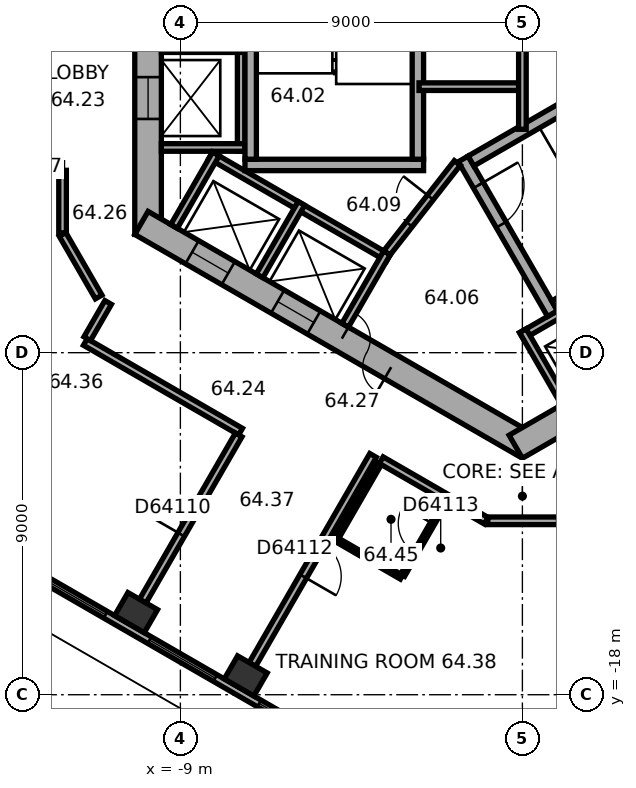
"""IFC4 building model, lengths in metres.
Left out: names, types, materials, properties, quantities, classifications, styles, units other than length and angle.
Written with IfcOpenShell. Run it as: python <this file> out.ifc"""

import sys

from ifc_helpers import new_model, si_unit, direction, frame, frame_2d, origin, origin_2d, place, context, subcontext, project, spatial, rectangle, extrude, element, fill, save


model = new_model("IFC4")
c1 = context("Model", 3, precision=1e-05, world=origin(), true_north=direction((0.0, 1.0)))
c2 = subcontext(c1, "Body", "Model", "MODEL_VIEW")
j1 = project(units=[si_unit("LENGTHUNIT", "METRE"), si_unit("PLANEANGLEUNIT", "RADIAN")], contexts=[c1])
p1 = place(None, origin())
s1 = spatial("IfcSite", under=j1, at=p1, CompositionType="ELEMENT")
p2 = place(p1, origin())
s2 = spatial("IfcBuilding", under=s1, at=p2, CompositionType="ELEMENT")
p3 = place(p2, frame((0.0, 0.0, 259.8)))
s3 = spatial("IfcBuildingStorey", under=s2, at=p3, CompositionType="ELEMENT", Elevation=259.8)
for number, where, z_axis, x_axis in (
    (1, (-10.165, -15.84, 0.0), (0.0, 0.0, 1.0), (0.866, -0.5, 0.0)),
    (2, (-7.28, -17.505, 0.0), (0.0, 0.0, 1.0), (0.866, -0.5, 0.0)),
):
    element("IfcColumn", number, at=place(p3, frame(where, z_axis=z_axis, x_axis=x_axis)), inside=s3, PredefinedType="COLUMN", context=c2, shape_type="SweptSolid", body=[
        extrude(rectangle(XDim=0.9, YDim=0.7, at=origin_2d()), origin(), (0.0, 0.0, 1.0), 3.7),
    ])
p4 = place(p3, frame((-9.85, 5.889, 0.0), z_axis=(0.0, 0.0, 1.0), x_axis=(0.0, -1.0, 0.0)))
e3 = element("IfcWall", 3, at=p4, inside=s3, PredefinedType="SHEAR", context=c2, shape_type="SweptSolid", body=[
    extrude(rectangle(XDim=11.778, YDim=0.7, at=frame_2d((5.889, 0.0))), origin(), (0.0, 0.0, 1.0), 3.7),
])
p5 = place(p4, frame((5.039, 0.0, 0.0)))
e4 = element("IfcOpeningElement", 4, at=p5, cuts=e3, PredefinedType="OPENING", context=c2, shape_type="SweptSolid", body=[
    extrude(rectangle(XDim=1.1, YDim=2.1, at=frame_2d((0.55, 1.05))), frame((0.0, 0.36, 0.0), z_axis=(0.0, -1.0, 0.0), x_axis=(1.0, 0.0, 0.0)), (0.0, 0.0, 1.0), 0.72),
])
p6 = place(p4, frame((7.639, 0.0, 0.0)))
e5 = element("IfcOpeningElement", 5, at=p6, cuts=e3, PredefinedType="OPENING", context=c2, shape_type="SweptSolid", body=[
    extrude(rectangle(XDim=1.1, YDim=2.1, at=frame_2d((0.55, 1.05))), frame((0.0, 0.36, 0.0), z_axis=(0.0, -1.0, 0.0), x_axis=(1.0, 0.0, 0.0)), (0.0, 0.0, 1.0), 0.72),
])
p7 = place(p3, frame((-10.025, -5.586, 0.0), z_axis=(0.0, 0.0, 1.0), x_axis=(0.866026453023, -0.499998182661, 0.0)))
e6 = element("IfcWall", 6, at=p7, inside=s3, PredefinedType="SHEAR", context=c2, shape_type="SweptSolid", body=[
    extrude(rectangle(XDim=11.778, YDim=0.7, at=frame_2d((5.889, 0.0))), origin(), (0.0, 0.0, 1.0), 3.7),
])
p8 = place(p7, frame((6.089, 0.0, 0.0)))
e7 = element("IfcOpeningElement", 7, at=p8, cuts=e6, PredefinedType="OPENING", context=c2, shape_type="SweptSolid", body=[
    extrude(rectangle(XDim=1.5, YDim=2.1, at=frame_2d((0.75, 1.05))), frame((0.0, 0.36, 0.0), z_axis=(0.0, -1.0, 0.0), x_axis=(1.0, 0.0, 0.0)), (0.0, 0.0, 1.0), 0.72),
])
p9 = place(p7, frame((1.539, 0.0, 0.0)))
e8 = element("IfcOpeningElement", 8, at=p9, cuts=e6, PredefinedType="OPENING", context=c2, shape_type="SweptSolid", body=[
    extrude(rectangle(XDim=1.1, YDim=2.1, at=frame_2d((0.55, 1.05))), frame((0.0, 0.36, 0.0), z_axis=(0.0, -1.0, 0.0), x_axis=(1.0, 0.0, 0.0)), (0.0, 0.0, 1.0), 0.72),
])
p10 = place(p7, frame((4.139, 0.0, 0.0)))
e9 = element("IfcOpeningElement", 9, at=p10, cuts=e6, PredefinedType="OPENING", context=c2, shape_type="SweptSolid", body=[
    extrude(rectangle(XDim=1.1, YDim=2.1, at=frame_2d((0.55, 1.05))), frame((0.0, 0.36, 0.0), z_axis=(0.0, -1.0, 0.0), x_axis=(1.0, 0.0, 0.0)), (0.0, 0.0, 1.0), 0.72),
])
p11 = place(p3, frame((-0.175, -11.475, 0.0), z_axis=(0.0, 0.0, 1.0), x_axis=(0.866026453023, 0.499998182661, 0.0)))
e10 = element("IfcWall", 10, at=p11, inside=s3, PredefinedType="SHEAR", context=c2, shape_type="SweptSolid", body=[
    extrude(rectangle(XDim=11.778, YDim=0.7, at=frame_2d((5.889, 0.0))), origin(), (0.0, 0.0, 1.0), 3.7),
])
p12 = place(p11, frame((2.439, 0.0, 0.0)))
e11 = element("IfcOpeningElement", 11, at=p12, cuts=e10, PredefinedType="OPENING", context=c2, shape_type="SweptSolid", body=[
    extrude(rectangle(XDim=1.1, YDim=2.1, at=frame_2d((0.55, 1.05))), frame((0.0, 0.36, 0.0), z_axis=(0.0, -1.0, 0.0), x_axis=(1.0, 0.0, 0.0)), (0.0, 0.0, 1.0), 0.72),
])
p13 = place(p11, frame((5.039, 0.0, 0.0)))
e12 = element("IfcOpeningElement", 12, at=p13, cuts=e10, PredefinedType="OPENING", context=c2, shape_type="SweptSolid", body=[
    extrude(rectangle(XDim=1.1, YDim=2.1, at=frame_2d((0.55, 1.05))), frame((0.0, 0.36, 0.0), z_axis=(0.0, -1.0, 0.0), x_axis=(1.0, 0.0, 0.0)), (0.0, 0.0, 1.0), 0.72),
])
p14 = place(p11, frame((7.639, 0.0, 0.0)))
e13 = element("IfcOpeningElement", 13, at=p14, cuts=e10, PredefinedType="OPENING", context=c2, shape_type="SweptSolid", body=[
    extrude(rectangle(XDim=1.1, YDim=2.1, at=frame_2d((0.55, 1.05))), frame((0.0, 0.36, 0.0), z_axis=(0.0, -1.0, 0.0), x_axis=(1.0, 0.0, 0.0)), (0.0, 0.0, 1.0), 0.72),
])
p15 = place(p3, frame((-16.626, -12.629, 0.0), z_axis=(0.0, 0.0, 1.0), x_axis=(0.866026460444, -0.499998169808, 0.0)))
e14 = element("IfcWall", 14, at=p15, inside=s3, PredefinedType="STANDARD", context=c2, shape_type="SweptSolid", body=[
    extrude(rectangle(XDim=17.731, YDim=0.2, at=frame_2d((8.866, 0.0))), origin(), (0.0, 0.0, 1.0), 3.7),
])
p16 = place(p15, frame((1.203, 0.0, 0.9)))
e15 = element("IfcOpeningElement", 15, at=p16, cuts=e14, PredefinedType="OPENING", context=c2, shape_type="SweptSolid", body=[
    extrude(rectangle(XDim=2.0, YDim=2.0, at=frame_2d((1.0, 1.0))), frame((0.0, 0.11, 0.0), z_axis=(0.0, -1.0, 0.0), x_axis=(1.0, 0.0, 0.0)), (0.0, 0.0, 1.0), 0.22),
])
p17 = place(p15, frame((4.535, 0.0, 0.9)))
e16 = element("IfcOpeningElement", 16, at=p17, cuts=e14, PredefinedType="OPENING", context=c2, shape_type="SweptSolid", body=[
    extrude(rectangle(XDim=2.0, YDim=2.0, at=frame_2d((1.0, 1.0))), frame((0.0, 0.11, 0.0), z_axis=(0.0, -1.0, 0.0), x_axis=(1.0, 0.0, 0.0)), (0.0, 0.0, 1.0), 0.22),
])
p18 = place(p15, frame((7.867, 0.0, 0.9)))
e17 = element("IfcOpeningElement", 17, at=p18, cuts=e14, PredefinedType="OPENING", context=c2, shape_type="SweptSolid", body=[
    extrude(rectangle(XDim=2.0, YDim=2.0, at=frame_2d((1.0, 1.0))), frame((0.0, 0.11, 0.0), z_axis=(0.0, -1.0, 0.0), x_axis=(1.0, 0.0, 0.0)), (0.0, 0.0, 1.0), 0.22),
])
p19 = place(p15, frame((11.198, 0.0, 0.9)))
e18 = element("IfcOpeningElement", 18, at=p19, cuts=e14, PredefinedType="OPENING", context=c2, shape_type="SweptSolid", body=[
    extrude(rectangle(XDim=2.0, YDim=2.0, at=frame_2d((1.0, 1.0))), frame((0.0, 0.11, 0.0), z_axis=(0.0, -1.0, 0.0), x_axis=(1.0, 0.0, 0.0)), (0.0, 0.0, 1.0), 0.22),
])
p20 = place(p15, frame((14.53, 0.0, 0.9)))
e19 = element("IfcOpeningElement", 19, at=p20, cuts=e14, PredefinedType="OPENING", context=c2, shape_type="SweptSolid", body=[
    extrude(rectangle(XDim=2.0, YDim=2.0, at=frame_2d((1.0, 1.0))), frame((0.0, 0.11, 0.0), z_axis=(0.0, -1.0, 0.0), x_axis=(1.0, 0.0, 0.0)), (0.0, 0.0, 1.0), 0.22),
])
p21 = place(p3, frame((-7.4, 4.3, 0.0), z_axis=(0.0, 0.0, 1.0), x_axis=(0.0, -1.0, 0.0)))
e20 = element("IfcWall", 20, at=p21, inside=s3, PredefinedType="PARTITIONING", context=c2, shape_type="SweptSolid", body=[
    extrude(rectangle(XDim=8.0, YDim=0.2, at=frame_2d((4.0, 0.0))), origin(), (0.0, 0.0, 1.0), 3.42),
])
p22 = place(p3, frame((-7.3, -3.6, 0.0), z_axis=(0.0, 0.0, 1.0), x_axis=(-1.0, 0.0, 0.0)))
e21 = element("IfcWall", 21, at=p22, inside=s3, PredefinedType="PARTITIONING", context=c2, shape_type="SweptSolid", body=[
    extrude(rectangle(XDim=2.2, YDim=0.2, at=frame_2d((1.1, 0.0))), origin(), (0.0, 0.0, 1.0), 3.42),
])
p23 = place(p3, frame((-8.203, -3.809, 0.0), z_axis=(0.0, 0.0, 1.0), x_axis=(0.866028230842, -0.499995103361, 0.0)))
e22 = element("IfcWall", 22, at=p23, inside=s3, PredefinedType="PARTITIONING", context=c2, shape_type="SweptSolid", body=[
    extrude(rectangle(XDim=5.4, YDim=0.2, at=frame_2d((2.7, 0.0))), origin(), (0.0, 0.0, 1.0), 3.42),
])
for number, where, z_axis, x_axis in (
    (23, (-8.067, -3.772, 0.0), (0.0, 0.0, 1.0), (-0.5, -0.866, 0.0)),
    (24, (-5.815, -5.072, 0.0), (0.0, 0.0, 1.0), (-0.5, -0.866, 0.0)),
):
    element("IfcWall", number, at=place(p3, frame(where, z_axis=z_axis, x_axis=x_axis)), inside=s3, PredefinedType="PARTITIONING", context=c2, shape_type="SweptSolid", body=[
        extrude(rectangle(XDim=2.2, YDim=0.2, at=frame_2d((1.1, 0.0))), origin(), (0.0, 0.0, 1.0), 3.42),
    ])
p24 = place(p3, frame((-3.563, -6.372, 0.0), z_axis=(0.0, 0.0, 1.0), x_axis=(-0.499994660107, -0.866028486751, 0.0)))
e25 = element("IfcWall", 25, at=p24, inside=s3, PredefinedType="PARTITIONING", context=c2, shape_type="SweptSolid", body=[
    extrude(rectangle(XDim=2.2, YDim=0.2, at=frame_2d((1.1, 0.0))), origin(), (0.0, 0.0, 1.0), 3.42),
])
p25 = place(p3, frame((-0.024, -8.559, 0.0), z_axis=(0.0, 0.0, 1.0), x_axis=(0.866026010844, 0.49999894854, 0.0)))
e26 = element("IfcWall", 26, at=p25, inside=s3, PredefinedType="PARTITIONING", context=c2, shape_type="SweptSolid", body=[
    extrude(rectangle(XDim=8.0, YDim=0.2, at=frame_2d((4.0, 0.0))), origin(), (0.0, 0.0, 1.0), 3.42),
])
p26 = place(p3, frame((0.013, -8.422, 0.0), z_axis=(0.0, 0.0, 1.0), x_axis=(0.500077893725, -0.86598042715, 0.0)))
e27 = element("IfcWall", 27, at=p26, inside=s3, PredefinedType="PARTITIONING", context=c2, shape_type="SweptSolid", body=[
    extrude(rectangle(XDim=2.2, YDim=0.2, at=frame_2d((1.1, 0.0))), origin(), (0.0, 0.0, 1.0), 3.42),
])
p27 = place(p3, frame((-2.6, -4.06, 0.0), z_axis=(0.0, 0.0, 1.0), x_axis=(-1.0, 0.0, 0.0)))
e28 = element("IfcWall", 28, at=p27, inside=s3, PredefinedType="SHEAR", context=c2, shape_type="SweptSolid", body=[
    extrude(rectangle(XDim=4.7, YDim=0.3, at=frame_2d((2.35, 0.0))), origin(), (0.0, 0.0, 1.0), 3.42),
])
for number, where, z_axis, x_axis in (
    (29, (-2.75, 3.15, 0.0), (0.0, 0.0, 1.0), (0.0, -1.0, 0.0)),
    (30, (-7.15, 3.15, 0.0), (0.0, 0.0, 1.0), (0.0, -1.0, 0.0)),
):
    element("IfcWall", number, at=place(p3, frame(where, z_axis=z_axis, x_axis=x_axis)), inside=s3, PredefinedType="SHEAR", context=c2, shape_type="SweptSolid", body=[
        extrude(rectangle(XDim=7.06, YDim=0.3, at=frame_2d((3.53, 0.0))), origin(), (0.0, 0.0, 1.0), 3.42),
    ])
p28 = place(p3, frame((-1.558, -3.902, 0.0), z_axis=(0.0, 0.0, 1.0), x_axis=(0.499977259774, -0.866038532462, 0.0)))
e31 = element("IfcWall", 31, at=p28, inside=s3, PredefinedType="SHEAR", context=c2, shape_type="SweptSolid", body=[
    extrude(rectangle(XDim=4.7, YDim=0.3, at=frame_2d((2.35, 0.0))), origin(), (0.0, 0.0, 1.0), 3.42),
])
p29 = place(p28, frame((0.8, 0.0, 0.0)))
e32 = element("IfcOpeningElement", 32, at=p29, cuts=e31, PredefinedType="OPENING", context=c2, shape_type="SweptSolid", body=[
    extrude(rectangle(XDim=1.2, YDim=2.1, at=frame_2d((0.6, 1.05))), frame((0.0, 0.16, 0.0), z_axis=(0.0, -1.0, 0.0), x_axis=(1.0, 0.0, 0.0)), (0.0, 0.0, 1.0), 0.32),
])
for number, where, z_axis, x_axis in (
    (33, (-1.353, -3.957, 0.0), (0.0, 0.0, 1.0), (0.866, 0.5, 0.0)),
    (34, (0.847, -7.767, 0.0), (0.0, 0.0, 1.0), (0.866, 0.5, 0.0)),
):
    element("IfcWall", number, at=place(p3, frame(where, z_axis=z_axis, x_axis=x_axis)), inside=s3, PredefinedType="SHEAR", context=c2, shape_type="SweptSolid", body=[
        extrude(rectangle(XDim=7.06, YDim=0.3, at=frame_2d((3.53, 0.0))), origin(), (0.0, 0.0, 1.0), 3.42),
    ])
p30 = place(p3, frame((-1.712, -4.008, 0.0), z_axis=(0.0, 0.0, 1.0), x_axis=(-0.616549420702, -0.787316208287, 0.0)))
e35 = element("IfcWall", 35, at=p30, inside=s3, PredefinedType="PARTITIONING", context=c2, shape_type="SweptSolid", body=[
    extrude(rectangle(XDim=3.002, YDim=0.2, at=frame_2d((1.501, 0.0))), origin(), (0.0, 0.0, 1.0), 3.42),
])
p31 = place(p30, frame((1.15, 0.0, 0.0)))
e36 = element("IfcOpeningElement", 36, at=p31, cuts=e35, PredefinedType="OPENING", context=c2, shape_type="SweptSolid", body=[
    extrude(rectangle(XDim=0.9, YDim=2.1, at=frame_2d((0.45, 1.05))), frame((0.0, 0.11, 0.0), z_axis=(0.0, -1.0, 0.0), x_axis=(1.0, 0.0, 0.0)), (0.0, 0.0, 1.0), 0.22),
])
p32 = place(p3, frame((-2.72, -2.0, 0.0), z_axis=(0.0, 0.0, 1.0), x_axis=(1.0, 0.0, 0.0)))
e37 = element("IfcWall", 37, at=p32, inside=s3, PredefinedType="PARTITIONING", context=c2, shape_type="SweptSolid", body=[
    extrude(rectangle(XDim=2.62, YDim=0.2, at=frame_2d((1.31, 0.0))), origin(), (0.0, 0.0, 1.0), 3.42),
])
p33 = place(p3, frame((0.0, -3.122, 0.0), z_axis=(0.0, 0.0, 1.0), x_axis=(0.0, 1.0, 0.0)))
e38 = element("IfcWall", 38, at=p33, inside=s3, PredefinedType="PARTITIONING", context=c2, shape_type="SweptSolid", body=[
    extrude(rectangle(XDim=6.245, YDim=0.2, at=frame_2d((3.122, 0.0))), origin(), (0.0, 0.0, 1.0), 3.42),
])
p34 = place(p3, frame((-13.301, -4.101, 0.0), z_axis=(0.0, 0.0, 1.0), x_axis=(1.0, 0.0, 0.0)))
e39 = element("IfcWall", 39, at=p34, inside=s3, PredefinedType="PARTITIONING", context=c2, shape_type="SweptSolid", body=[
    extrude(rectangle(XDim=1.201, YDim=0.2, at=frame_2d((0.601, 0.0))), origin(), (0.0, 0.0, 1.0), 3.42),
])
p35 = place(p3, frame((-12.1, -5.889, 0.0), z_axis=(0.0, 0.0, 1.0), x_axis=(0.500063520245, -0.865988727248, 0.0)))
e40 = element("IfcWall", 40, at=p35, inside=s3, PredefinedType="PARTITIONING", context=c2, shape_type="SweptSolid", body=[
    extrude(rectangle(XDim=1.9, YDim=0.2, at=frame_2d((0.95, 0.0))), origin(), (0.0, 0.0, 1.0), 3.42),
])
p36 = place(p3, frame((-12.1, -4.201, 0.0), z_axis=(0.0, 0.0, 1.0), x_axis=(0.0, -1.0, 0.0)))
e41 = element("IfcWall", 41, at=p36, inside=s3, PredefinedType="PARTITIONING", context=c2, shape_type="SweptSolid", body=[
    extrude(rectangle(XDim=1.648, YDim=0.2, at=frame_2d((0.824, 0.0))), origin(), (0.0, 0.0, 1.0), 3.42),
])
p37 = place(p3, frame((-11.501, -8.719, 0.0), z_axis=(0.0, 0.0, 1.0), x_axis=(0.866024434742, -0.500001678427, 0.0)))
e42 = element("IfcWall", 42, at=p37, inside=s3, PredefinedType="PARTITIONING", context=c2, shape_type="SweptSolid", body=[
    extrude(rectangle(XDim=4.718, YDim=0.2, at=frame_2d((2.359, 0.0))), origin(), (0.0, 0.0, 1.0), 3.42),
])
p38 = place(p3, frame((-10.901, -7.678, 0.0), z_axis=(0.0, 0.0, 1.0), x_axis=(-0.500074377092, -0.865982457891, 0.0)))
e43 = element("IfcWall", 43, at=p38, inside=s3, PredefinedType="PARTITIONING", context=c2, shape_type="SweptSolid", body=[
    extrude(rectangle(XDim=1.101, YDim=0.2, at=frame_2d((0.55, 0.0))), origin(), (0.0, 0.0, 1.0), 3.42),
])
p39 = place(p3, frame((-9.99, -15.537, 0.0), z_axis=(0.0, 0.0, 1.0), x_axis=(0.499966611936, 0.866044679534, 0.0)))
e44 = element("IfcWall", 44, at=p39, inside=s3, PredefinedType="PARTITIONING", context=c2, shape_type="SweptSolid", body=[
    extrude(rectangle(XDim=5.049, YDim=0.2, at=frame_2d((2.524, 0.0))), origin(), (0.0, 0.0, 1.0), 2.87),
])
p40 = place(p39, frame((2.024, 0.0, 0.0)))
e45 = element("IfcOpeningElement", 45, at=p40, cuts=e44, PredefinedType="OPENING", context=c2, shape_type="SweptSolid", body=[
    extrude(rectangle(XDim=1.0, YDim=2.1, at=frame_2d((0.5, 1.05))), frame((0.0, 0.11, 0.0), z_axis=(0.0, -1.0, 0.0), x_axis=(1.0, 0.0, 0.0)), (0.0, 0.0, 1.0), 0.22),
])
p41 = place(p3, frame((-7.105, -17.202, 0.0), z_axis=(0.0, 0.0, 1.0), x_axis=(0.499988692146, 0.866031932279, 0.0)))
e46 = element("IfcWall", 46, at=p41, inside=s3, PredefinedType="PARTITIONING", context=c2, shape_type="SweptSolid", body=[
    extrude(rectangle(XDim=6.35, YDim=0.2, at=frame_2d((3.175, 0.0))), origin(), (0.0, 0.0, 1.0), 3.42),
])
p42 = place(p41, frame((2.675, 0.0, 0.0)))
e47 = element("IfcOpeningElement", 47, at=p42, cuts=e46, PredefinedType="OPENING", context=c2, shape_type="SweptSolid", body=[
    extrude(rectangle(XDim=1.0, YDim=2.1, at=frame_2d((0.5, 1.05))), frame((0.0, 0.11, 0.0), z_axis=(0.0, -1.0, 0.0), x_axis=(1.0, 0.0, 0.0)), (0.0, 0.0, 1.0), 0.22),
])
p43 = place(p3, frame((-4.913, -13.906, 0.0), z_axis=(0.0, 0.0, 1.0), x_axis=(0.500031774688, 0.866007057882, 0.0)))
e48 = element("IfcWall", 48, at=p43, inside=s3, PredefinedType="PARTITIONING", context=c2, shape_type="SweptSolid", body=[
    extrude(rectangle(XDim=2.3, YDim=0.12, at=frame_2d((1.15, 0.0))), origin(), (0.0, 0.0, 1.0), 3.42),
])
p44 = place(p3, frame((-3.713, -11.828, 0.0), z_axis=(0.0, 0.0, 1.0), x_axis=(0.866026321388, -0.499998410661, 0.0)))
e49 = element("IfcWall", 49, at=p44, inside=s3, PredefinedType="PARTITIONING", context=c2, shape_type="SweptSolid", body=[
    extrude(rectangle(XDim=3.191, YDim=0.2, at=frame_2d((1.595, 0.0))), origin(), (0.0, 0.0, 1.0), 3.42),
])
p45 = place(p3, frame((-3.181, -14.906, 0.0), z_axis=(0.0, 0.0, 1.0), x_axis=(-0.866043088465, 0.499969367985, 0.0)))
e50 = element("IfcWall", 50, at=p45, inside=s3, PredefinedType="PARTITIONING", context=c2, shape_type="SweptSolid", body=[
    extrude(rectangle(XDim=1.94, YDim=0.12, at=frame_2d((0.97, 0.0))), origin(), (0.0, 0.0, 1.0), 3.42),
])
p46 = place(p3, frame((-2.031, -12.915, 0.0), z_axis=(0.0, 0.0, 1.0), x_axis=(-0.49994888933, -0.866054910533, 0.0)))
e51 = element("IfcWall", 51, at=p46, inside=s3, PredefinedType="PARTITIONING", context=c2, shape_type="SweptSolid", body=[
    extrude(rectangle(XDim=2.24, YDim=0.12, at=frame_2d((1.12, 0.0))), origin(), (0.0, 0.0, 1.0), 3.42),
])
p47 = place(p46, frame((0.67, 0.0, 0.0)))
e52 = element("IfcOpeningElement", 52, at=p47, cuts=e51, PredefinedType="OPENING", context=c2, shape_type="SweptSolid", body=[
    extrude(rectangle(XDim=0.9, YDim=2.1, at=frame_2d((0.45, 1.05))), frame((0.0, 0.07, 0.0), z_axis=(0.0, -1.0, 0.0), x_axis=(1.0, 0.0, 0.0)), (0.0, 0.0, 1.0), 0.14),
])
p48 = place(p3, frame((-0.91, -13.423, 0.0), z_axis=(0.0, 0.0, 1.0), x_axis=(1.0, 0.0, 0.0)))
e53 = element("IfcWall", 53, at=p48, inside=s3, PredefinedType="PARTITIONING", context=c2, shape_type="SweptSolid", body=[
    extrude(rectangle(XDim=1.86, YDim=0.2, at=frame_2d((0.93, 0.0))), origin(), (0.0, 0.0, 1.0), 3.42),
])
p49 = place(p17, origin())
e54 = element("IfcWindow", 54, at=p49, inside=s3, PartitioningType="SINGLE_PANEL", PredefinedType="WINDOW", context=c2, shape_type="SweptSolid", body=[
    extrude(rectangle(XDim=2.0, YDim=2.0, at=frame_2d((1.0, 1.0))), frame((0.0, 0.03, 0.0), z_axis=(0.0, -1.0, 0.0), x_axis=(1.0, 0.0, 0.0)), (0.0, 0.0, 1.0), 0.06),
])
fill(e16, e54)
p50 = place(p18, origin())
e55 = element("IfcWindow", 55, at=p50, inside=s3, PartitioningType="SINGLE_PANEL", PredefinedType="WINDOW", context=c2, shape_type="SweptSolid", body=[
    extrude(rectangle(XDim=2.0, YDim=2.0, at=frame_2d((1.0, 1.0))), frame((0.0, 0.03, 0.0), z_axis=(0.0, -1.0, 0.0), x_axis=(1.0, 0.0, 0.0)), (0.0, 0.0, 1.0), 0.06),
])
fill(e17, e55)
p51 = place(p19, origin())
e56 = element("IfcWindow", 56, at=p51, inside=s3, PartitioningType="SINGLE_PANEL", PredefinedType="WINDOW", context=c2, shape_type="SweptSolid", body=[
    extrude(rectangle(XDim=2.0, YDim=2.0, at=frame_2d((1.0, 1.0))), frame((0.0, 0.03, 0.0), z_axis=(0.0, -1.0, 0.0), x_axis=(1.0, 0.0, 0.0)), (0.0, 0.0, 1.0), 0.06),
])
fill(e18, e56)
p52 = place(p8, origin())
e57 = element("IfcDoor", 57, at=p52, inside=s3, OperationType="DOUBLE_DOOR_SINGLE_SWING", PredefinedType="DOOR", context=c2, shape_type="SweptSolid", body=[
    extrude(rectangle(XDim=1.5, YDim=2.1, at=frame_2d((0.75, 1.05))), frame((0.0, 0.025, 0.0), z_axis=(0.0, -1.0, 0.0), x_axis=(1.0, 0.0, 0.0)), (0.0, 0.0, 1.0), 0.05),
])
fill(e7, e57)
p53 = place(p29, origin())
e58 = element("IfcDoor", 58, at=p53, inside=s3, OperationType="SINGLE_SWING_RIGHT", PredefinedType="DOOR", context=c2, shape_type="SweptSolid", body=[
    extrude(rectangle(XDim=1.2, YDim=2.1, at=frame_2d((0.6, 1.05))), frame((0.0, 0.025, 0.0), z_axis=(0.0, -1.0, 0.0), x_axis=(1.0, 0.0, 0.0)), (0.0, 0.0, 1.0), 0.05),
])
fill(e32, e58)
p54 = place(p31, origin())
e59 = element("IfcDoor", 59, at=p54, inside=s3, OperationType="SINGLE_SWING_LEFT", PredefinedType="DOOR", context=c2, shape_type="SweptSolid", body=[
    extrude(rectangle(XDim=0.9, YDim=2.1, at=frame_2d((0.45, 1.05))), frame((0.0, 0.025, 0.0), z_axis=(0.0, -1.0, 0.0), x_axis=(1.0, 0.0, 0.0)), (0.0, 0.0, 1.0), 0.05),
])
fill(e36, e59)
p55 = place(p6, origin())
e60 = element("IfcDoor", 60, at=p55, inside=s3, OperationType="DOUBLE_DOOR_SLIDING", PredefinedType="DOOR", context=c2, shape_type="SweptSolid", body=[
    extrude(rectangle(XDim=1.1, YDim=2.1, at=frame_2d((0.55, 1.05))), frame((0.0, 0.025, 0.0), z_axis=(0.0, -1.0, 0.0), x_axis=(1.0, 0.0, 0.0)), (0.0, 0.0, 1.0), 0.05),
])
fill(e5, e60)
p56 = place(p9, origin())
e61 = element("IfcDoor", 61, at=p56, inside=s3, OperationType="DOUBLE_DOOR_SLIDING", PredefinedType="DOOR", context=c2, shape_type="SweptSolid", body=[
    extrude(rectangle(XDim=1.1, YDim=2.1, at=frame_2d((0.55, 1.05))), frame((0.0, 0.025, 0.0), z_axis=(0.0, -1.0, 0.0), x_axis=(1.0, 0.0, 0.0)), (0.0, 0.0, 1.0), 0.05),
])
fill(e8, e61)
p57 = place(p10, origin())
e62 = element("IfcDoor", 62, at=p57, inside=s3, OperationType="DOUBLE_DOOR_SLIDING", PredefinedType="DOOR", context=c2, shape_type="SweptSolid", body=[
    extrude(rectangle(XDim=1.1, YDim=2.1, at=frame_2d((0.55, 1.05))), frame((0.0, 0.025, 0.0), z_axis=(0.0, -1.0, 0.0), x_axis=(1.0, 0.0, 0.0)), (0.0, 0.0, 1.0), 0.05),
])
fill(e9, e62)
p58 = place(p40, origin())
e63 = element("IfcDoor", 63, at=p58, inside=s3, OperationType="SINGLE_SWING_LEFT", PredefinedType="DOOR", context=c2, shape_type="SweptSolid", body=[
    extrude(rectangle(XDim=1.0, YDim=2.1, at=frame_2d((0.5, 1.05))), frame((0.0, 0.025, 0.0), z_axis=(0.0, -1.0, 0.0), x_axis=(1.0, 0.0, 0.0)), (0.0, 0.0, 1.0), 0.05),
])
fill(e45, e63)
p59 = place(p42, origin())
e64 = element("IfcDoor", 64, at=p59, inside=s3, OperationType="SINGLE_SWING_LEFT", PredefinedType="DOOR", context=c2, shape_type="SweptSolid", body=[
    extrude(rectangle(XDim=1.0, YDim=2.1, at=frame_2d((0.5, 1.05))), frame((0.0, 0.025, 0.0), z_axis=(0.0, -1.0, 0.0), x_axis=(1.0, 0.0, 0.0)), (0.0, 0.0, 1.0), 0.05),
])
fill(e47, e64)
p60 = place(p47, origin())
e65 = element("IfcDoor", 65, at=p60, inside=s3, OperationType="SINGLE_SWING_LEFT", PredefinedType="DOOR", context=c2, shape_type="SweptSolid", body=[
    extrude(rectangle(XDim=0.9, YDim=2.1, at=frame_2d((0.45, 1.05))), frame((0.0, 0.025, 0.0), z_axis=(0.0, -1.0, 0.0), x_axis=(1.0, 0.0, 0.0)), (0.0, 0.0, 1.0), 0.05),
])
fill(e52, e65)
save(model, sys.argv[1])
